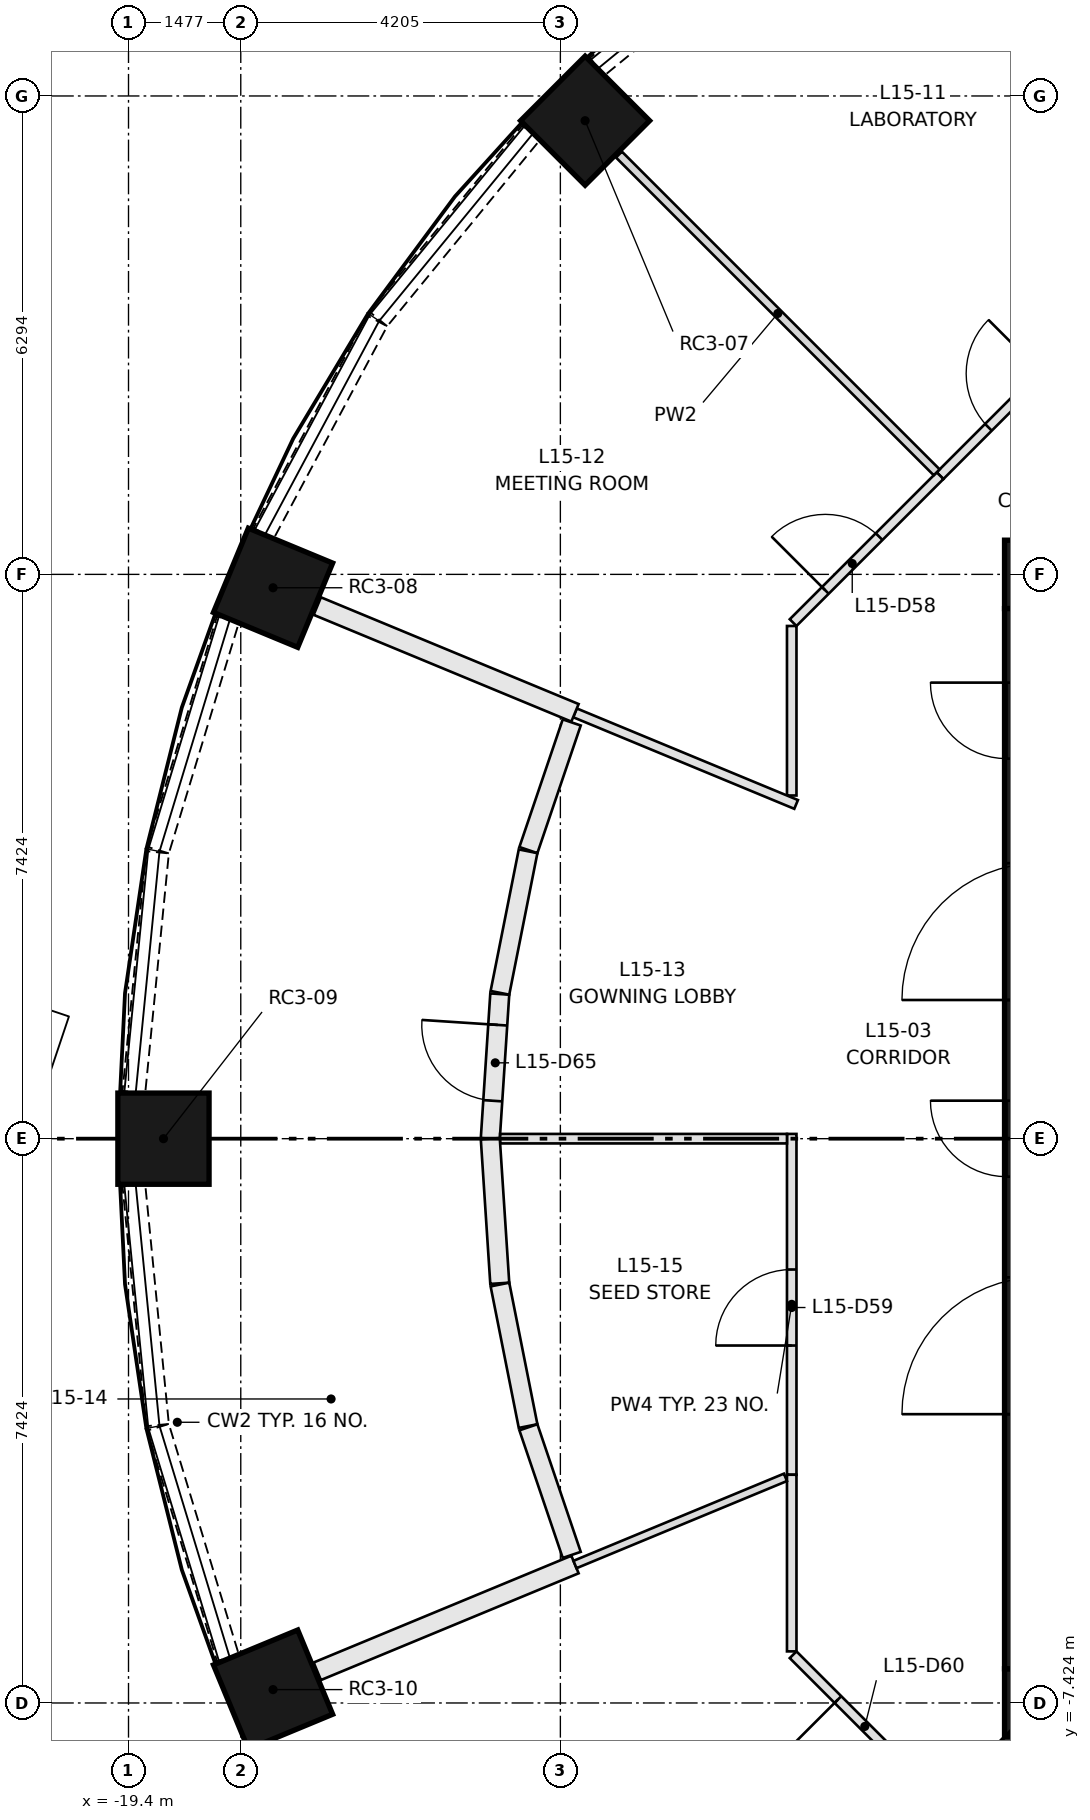
"""IFC4 building model, lengths in metres.
Left out: names, types, materials, properties, quantities, classifications, styles, units other than length and angle.
Written with IfcOpenShell. Run it as: python <this file> out.ifc"""

import sys

from ifc_helpers import new_model, si_unit, direction, frame, frame_2d, origin, origin_2d, place, context, subcontext, project, spatial, rectangle, extrude, element, fill, save


model = new_model("IFC4")
c1 = context("Model", 3, precision=1e-05, world=origin(), true_north=direction((0.0, 1.0)))
c2 = subcontext(c1, "Body", "Model", "MODEL_VIEW")
j1 = project(units=[si_unit("LENGTHUNIT", "METRE"), si_unit("PLANEANGLEUNIT", "RADIAN")], contexts=[c1])
p1 = place(None, origin())
s1 = spatial("IfcSite", under=j1, at=p1, CompositionType="ELEMENT")
p2 = place(p1, origin())
s2 = spatial("IfcBuilding", under=s1, at=p2, CompositionType="ELEMENT")
p3 = place(p2, frame((0.0, 0.0, 59.05)))
s3 = spatial("IfcBuildingStorey", under=s2, at=p3, CompositionType="ELEMENT", Elevation=59.05)
for number, where, z_axis, x_axis in (
    (1, (-13.393, 13.393, 0.0), (0.0, 0.0, 1.0), (-0.707, 0.707, 0.0)),
    (2, (-17.498, 7.248, 0.0), (0.0, 0.0, 1.0), (-0.924, 0.383, 0.0)),
    (3, (-18.94, 0.0, 0.0), (0.0, 0.0, 1.0), (-1.0, 0.0, 0.0)),
    (4, (-17.498, -7.248, 0.0), (0.0, 0.0, 1.0), (-0.924, -0.383, 0.0)),
):
    element("IfcColumn", number, at=place(p3, frame(where, z_axis=z_axis, x_axis=x_axis)), inside=s3, PredefinedType="COLUMN", context=c2, shape_type="SweptSolid", body=[
        extrude(rectangle(XDim=1.2, YDim=1.2, at=origin_2d()), origin(), (0.0, 0.0, 1.0), 3.65),
    ])
for number, where, z_axis, x_axis in (
    (5, (-7.874, -7.424, 0.0), (0.0, 0.0, 1.0), (1.0, 0.0, 0.0)),
    (6, (-7.874, 7.424, 0.0), (0.0, 0.0, 1.0), (1.0, 0.0, 0.0)),
):
    element("IfcWall", number, at=place(p3, frame(where, z_axis=z_axis, x_axis=x_axis)), inside=s3, PredefinedType="SHEAR", context=c2, shape_type="SweptSolid", body=[
        extrude(rectangle(XDim=15.748, YDim=0.9, at=frame_2d((7.874, 0.0))), origin(), (0.0, 0.0, 1.0), 3.65),
    ])
p4 = place(p3, frame((-7.424, -6.974, 0.0), z_axis=(0.0, 0.0, 1.0), x_axis=(0.0, 1.0, 0.0)))
e7 = element("IfcWall", 7, at=p4, inside=s3, PredefinedType="SHEAR", context=c2, shape_type="SweptSolid", body=[
    extrude(rectangle(XDim=13.948, YDim=0.9, at=frame_2d((6.974, 0.0))), origin(), (0.0, 0.0, 1.0), 3.65),
])
p5 = place(p4, frame((6.474, 0.0, 0.0)))
e8 = element("IfcOpeningElement", 8, at=p5, cuts=e7, PredefinedType="OPENING", context=c2, shape_type="SweptSolid", body=[
    extrude(rectangle(XDim=1.0, YDim=2.1, at=frame_2d((0.5, 1.05))), frame((0.0, 0.46, 0.0), z_axis=(0.0, -1.0, 0.0), x_axis=(1.0, 0.0, 0.0)), (0.0, 0.0, 1.0), 0.92),
])
p6 = place(p4, frame((3.35, 0.0, 0.0)))
e9 = element("IfcOpeningElement", 9, at=p6, cuts=e7, PredefinedType="OPENING", context=c2, shape_type="SweptSolid", body=[
    extrude(rectangle(XDim=1.8, YDim=2.1, at=frame_2d((0.9, 1.05))), frame((0.0, 0.46, 0.0), z_axis=(0.0, -1.0, 0.0), x_axis=(1.0, 0.0, 0.0)), (0.0, 0.0, 1.0), 0.92),
])
p7 = place(p4, frame((8.799, 0.0, 0.0)))
e10 = element("IfcOpeningElement", 10, at=p7, cuts=e7, PredefinedType="OPENING", context=c2, shape_type="SweptSolid", body=[
    extrude(rectangle(XDim=1.8, YDim=2.1, at=frame_2d((0.9, 1.05))), frame((0.0, 0.46, 0.0), z_axis=(0.0, -1.0, 0.0), x_axis=(1.0, 0.0, 0.0)), (0.0, 0.0, 1.0), 0.92),
])
p8 = place(p4, frame((11.974, 0.0, 0.0)))
e11 = element("IfcOpeningElement", 11, at=p8, cuts=e7, PredefinedType="OPENING", context=c2, shape_type="SweptSolid", body=[
    extrude(rectangle(XDim=1.0, YDim=2.1, at=frame_2d((0.5, 1.05))), frame((0.0, 0.46, 0.0), z_axis=(0.0, -1.0, 0.0), x_axis=(1.0, 0.0, 0.0)), (0.0, 0.0, 1.0), 0.92),
])
for number, where, z_axis, x_axis in (
    (12, (-10.784, 16.113, 0.0), (0.0, 0.0, 1.0), (-0.773, -0.634, 0.0)),
    (13, (-14.103, 13.234, 0.0), (0.0, 0.0, 1.0), (-0.634, -0.773, 0.0)),
):
    element("IfcWall", number, at=place(p3, frame(where, z_axis=z_axis, x_axis=x_axis)), inside=s3, PredefinedType="SOLIDWALL", context=c2, shape_type="SweptSolid", body=[
        extrude(rectangle(XDim=3.169, YDim=0.3, at=frame_2d((1.585, 0.0))), origin(), (0.0, 0.0, 1.0), 0.9),
    ])
p9 = place(p3, frame((-16.129, 10.759, 0.0), z_axis=(0.0, 0.0, 1.0), x_axis=(-0.47123575379, -0.882007292685, 0.0)))
e14 = element("IfcWall", 14, at=p9, inside=s3, PredefinedType="SOLIDWALL", context=c2, shape_type="SweptSolid", body=[
    extrude(rectangle(XDim=3.17, YDim=0.3, at=frame_2d((1.585, 0.0))), origin(), (0.0, 0.0, 1.0), 0.9),
])
p10 = place(p3, frame((-18.092, 6.83, 0.0), z_axis=(0.0, 0.0, 1.0), x_axis=(-0.290456409527, -0.956888224489, 0.0)))
e15 = element("IfcWall", 15, at=p10, inside=s3, PredefinedType="SOLIDWALL", context=c2, shape_type="SweptSolid", body=[
    extrude(rectangle(XDim=3.169, YDim=0.3, at=frame_2d((1.584, 0.0))), origin(), (0.0, 0.0, 1.0), 0.9),
])
for number, where, z_axis, x_axis in (
    (16, (-19.019, 3.768, 0.0), (0.0, 0.0, 1.0), (-0.098, -0.995, 0.0)),
    (17, (-19.33, -0.613, 0.0), (0.0, 0.0, 1.0), (0.098, -0.995, 0.0)),
):
    element("IfcWall", number, at=place(p3, frame(where, z_axis=z_axis, x_axis=x_axis)), inside=s3, PredefinedType="SOLIDWALL", context=c2, shape_type="SweptSolid", body=[
        extrude(rectangle(XDim=3.171, YDim=0.3, at=frame_2d((1.585, 0.0))), origin(), (0.0, 0.0, 1.0), 0.9),
    ])
p11 = place(p3, frame((-19.013, -3.797, 0.0), z_axis=(0.0, 0.0, 1.0), x_axis=(0.290456409527, -0.956888224489, 0.0)))
e18 = element("IfcWall", 18, at=p11, inside=s3, PredefinedType="SOLIDWALL", context=c2, shape_type="SweptSolid", body=[
    extrude(rectangle(XDim=3.169, YDim=0.3, at=frame_2d((1.584, 0.0))), origin(), (0.0, 0.0, 1.0), 0.9),
])
p12 = place(p3, frame((-17.623, -7.963, 0.0), z_axis=(0.0, 0.0, 1.0), x_axis=(0.47123575379, -0.882007292685, 0.0)))
e19 = element("IfcWall", 19, at=p12, inside=s3, PredefinedType="SOLIDWALL", context=c2, shape_type="SweptSolid", body=[
    extrude(rectangle(XDim=3.17, YDim=0.3, at=frame_2d((1.585, 0.0))), origin(), (0.0, 0.0, 1.0), 0.9),
])
p13 = place(p3, frame((-8.722, 8.722, 0.0), z_axis=(0.0, 0.0, 1.0), x_axis=(0.707062130741, 0.707151428813, 0.0)))
e20 = element("IfcWall", 20, at=p13, inside=s3, PredefinedType="PARTITIONING", context=c2, shape_type="SweptSolid", body=[
    extrude(rectangle(XDim=2.734, YDim=0.125, at=frame_2d((1.367, 0.0))), origin(), (0.0, 0.0, 1.0), 3.3),
])
p14 = place(p13, frame((0.9, 0.0, 0.0)))
e21 = element("IfcOpeningElement", 21, at=p14, cuts=e20, PredefinedType="OPENING", context=c2, shape_type="SweptSolid", body=[
    extrude(rectangle(XDim=1.0, YDim=2.1, at=frame_2d((0.5, 1.05))), frame((0.0, 0.073, 0.0), z_axis=(0.0, -1.0, 0.0), x_axis=(1.0, 0.0, 0.0)), (0.0, 0.0, 1.0), 0.145),
])
p15 = place(p3, frame((-10.674, 4.515, 0.0), z_axis=(0.0, 0.0, 1.0), x_axis=(0.0, 1.0, 0.0)))
e22 = element("IfcWall", 22, at=p15, inside=s3, PredefinedType="PARTITIONING", context=c2, shape_type="SweptSolid", body=[
    extrude(rectangle(XDim=2.23, YDim=0.125, at=frame_2d((1.115, 0.0))), origin(), (0.0, 0.0, 1.0), 3.3),
])
p16 = place(p3, frame((-10.656, 6.789, 0.0), z_axis=(0.0, 0.0, 1.0), x_axis=(0.707151428813, 0.707062130741, 0.0)))
e23 = element("IfcWall", 23, at=p16, inside=s3, PredefinedType="PARTITIONING", context=c2, shape_type="SweptSolid", body=[
    extrude(rectangle(XDim=2.734, YDim=0.125, at=frame_2d((1.367, 0.0))), origin(), (0.0, 0.0, 1.0), 3.3),
])
p17 = place(p16, frame((0.6, 0.0, 0.0)))
e24 = element("IfcOpeningElement", 24, at=p17, cuts=e23, PredefinedType="OPENING", context=c2, shape_type="SweptSolid", body=[
    extrude(rectangle(XDim=1.0, YDim=2.1, at=frame_2d((0.5, 1.05))), frame((0.0, 0.073, 0.0), z_axis=(0.0, -1.0, 0.0), x_axis=(1.0, 0.0, 0.0)), (0.0, 0.0, 1.0), 0.145),
])
p18 = place(p3, frame((-10.674, -4.421, 0.0), z_axis=(0.0, 0.0, 1.0), x_axis=(0.0, 1.0, 0.0)))
e25 = element("IfcWall", 25, at=p18, inside=s3, PredefinedType="PARTITIONING", context=c2, shape_type="SweptSolid", body=[
    extrude(rectangle(XDim=4.484, YDim=0.125, at=frame_2d((2.242, 0.0))), origin(), (0.0, 0.0, 1.0), 3.3),
])
p19 = place(p18, frame((1.7, 0.0, 0.0)))
e26 = element("IfcOpeningElement", 26, at=p19, cuts=e25, PredefinedType="OPENING", context=c2, shape_type="SweptSolid", body=[
    extrude(rectangle(XDim=1.0, YDim=2.1, at=frame_2d((0.5, 1.05))), frame((0.0, 0.073, 0.0), z_axis=(0.0, -1.0, 0.0), x_axis=(1.0, 0.0, 0.0)), (0.0, 0.0, 1.0), 0.145),
])
p20 = place(p3, frame((-10.674, -6.745, 0.0), z_axis=(0.0, 0.0, 1.0), x_axis=(0.0, 1.0, 0.0)))
e27 = element("IfcWall", 27, at=p20, inside=s3, PredefinedType="PARTITIONING", context=c2, shape_type="SweptSolid", body=[
    extrude(rectangle(XDim=2.324, YDim=0.125, at=frame_2d((1.162, 0.0))), origin(), (0.0, 0.0, 1.0), 3.3),
])
p21 = place(p3, frame((-8.722, -8.722, 0.0), z_axis=(0.0, 0.0, 1.0), x_axis=(-0.707151428813, 0.707062130741, 0.0)))
e28 = element("IfcWall", 28, at=p21, inside=s3, PredefinedType="PARTITIONING", context=c2, shape_type="SweptSolid", body=[
    extrude(rectangle(XDim=2.734, YDim=0.125, at=frame_2d((1.367, 0.0))), origin(), (0.0, 0.0, 1.0), 3.3),
])
p22 = place(p21, frame((0.9, 0.0, 0.0)))
e29 = element("IfcOpeningElement", 29, at=p22, cuts=e28, PredefinedType="OPENING", context=c2, shape_type="SweptSolid", body=[
    extrude(rectangle(XDim=1.0, YDim=2.1, at=frame_2d((0.5, 1.05))), frame((0.0, 0.073, 0.0), z_axis=(0.0, -1.0, 0.0), x_axis=(1.0, 0.0, 0.0)), (0.0, 0.0, 1.0), 0.145),
])
p23 = place(p3, frame((-8.767, 8.767, 0.0), z_axis=(0.0, 0.0, 1.0), x_axis=(-0.707106781187, 0.707106781187, 0.0)))
e30 = element("IfcWall", 30, at=p23, inside=s3, PredefinedType="PARTITIONING", context=c2, shape_type="SweptSolid", body=[
    extrude(rectangle(XDim=5.912, YDim=0.11, at=frame_2d((2.956, 0.0))), origin(), (0.0, 0.0, 1.0), 3.3),
])
p24 = place(p3, frame((-10.616, 4.397, 0.0), z_axis=(0.0, 0.0, 1.0), x_axis=(-0.923884549049, 0.382671321147, 0.0)))
e31 = element("IfcWall", 31, at=p24, inside=s3, PredefinedType="PARTITIONING", context=c2, shape_type="SweptSolid", body=[
    extrude(rectangle(XDim=3.149, YDim=0.125, at=frame_2d((1.575, 0.0))), origin(), (0.0, 0.0, 1.0), 3.3),
])
p25 = place(p3, frame((-13.526, 5.603, 0.0), z_axis=(0.0, 0.0, 1.0), x_axis=(-0.923870076355, 0.382706260748, 0.0)))
e32 = element("IfcWall", 32, at=p25, inside=s3, PredefinedType="PARTITIONING", context=c2, shape_type="SweptSolid", body=[
    extrude(rectangle(XDim=3.67, YDim=0.25, at=frame_2d((1.835, 0.0))), origin(), (0.0, 0.0, 1.0), 3.3),
])
p26 = place(p3, frame((-14.64, 0.0, 0.0), z_axis=(0.0, 0.0, 1.0), x_axis=(0.065303653727, 0.997865438228, 0.0)))
e33 = element("IfcWall", 33, at=p26, inside=s3, PredefinedType="PARTITIONING", context=c2, shape_type="SweptSolid", body=[
    extrude(rectangle(XDim=1.907, YDim=0.25, at=frame_2d((0.953, 0.0))), origin(), (0.0, 0.0, 1.0), 3.3),
])
p27 = place(p26, frame((0.5, 0.0, 0.0)))
e34 = element("IfcOpeningElement", 34, at=p27, cuts=e33, PredefinedType="OPENING", context=c2, shape_type="SweptSolid", body=[
    extrude(rectangle(XDim=1.0, YDim=2.1, at=frame_2d((0.5, 1.05))), frame((0.0, 0.135, 0.0), z_axis=(0.0, -1.0, 0.0), x_axis=(1.0, 0.0, 0.0)), (0.0, 0.0, 1.0), 0.27),
])
p28 = place(p3, frame((-14.513, 1.919, 0.0), z_axis=(0.0, 0.0, 1.0), x_axis=(0.195077379777, 0.980787854686, 0.0)))
e35 = element("IfcWall", 35, at=p28, inside=s3, PredefinedType="PARTITIONING", context=c2, shape_type="SweptSolid", body=[
    extrude(rectangle(XDim=1.898, YDim=0.25, at=frame_2d((0.949, 0.0))), origin(), (0.0, 0.0, 1.0), 3.3),
])
p29 = place(p3, frame((-14.139, 3.797, 0.0), z_axis=(0.0, 0.0, 1.0), x_axis=(0.321468303742, 0.946920339674, 0.0)))
e36 = element("IfcWall", 36, at=p29, inside=s3, PredefinedType="PARTITIONING", context=c2, shape_type="SweptSolid", body=[
    extrude(rectangle(XDim=1.773, YDim=0.25, at=frame_2d((0.887, 0.0))), origin(), (0.0, 0.0, 1.0), 3.3),
])
p30 = place(p3, frame((-10.737, 0.0, 0.0), z_axis=(0.0, 0.0, 1.0), x_axis=(-1.0, 0.0, 0.0)))
e37 = element("IfcWall", 37, at=p30, inside=s3, PredefinedType="PARTITIONING", context=c2, shape_type="SweptSolid", body=[
    extrude(rectangle(XDim=3.774, YDim=0.125, at=frame_2d((1.887, 0.0))), origin(), (0.0, 0.0, 1.0), 3.3),
])
p31 = place(p3, frame((-14.64, 0.0, 0.0), z_axis=(0.0, 0.0, 1.0), x_axis=(0.065303653727, -0.997865438228, 0.0)))
e38 = element("IfcWall", 38, at=p31, inside=s3, PredefinedType="PARTITIONING", context=c2, shape_type="SweptSolid", body=[
    extrude(rectangle(XDim=1.907, YDim=0.25, at=frame_2d((0.953, 0.0))), origin(), (0.0, 0.0, 1.0), 3.3),
])
p32 = place(p3, frame((-14.513, -1.919, 0.0), z_axis=(0.0, 0.0, 1.0), x_axis=(0.195077379777, -0.980787854686, 0.0)))
e39 = element("IfcWall", 39, at=p32, inside=s3, PredefinedType="PARTITIONING", context=c2, shape_type="SweptSolid", body=[
    extrude(rectangle(XDim=1.898, YDim=0.25, at=frame_2d((0.949, 0.0))), origin(), (0.0, 0.0, 1.0), 3.3),
])
p33 = place(p3, frame((-14.139, -3.797, 0.0), z_axis=(0.0, 0.0, 1.0), x_axis=(0.321468303742, -0.946920339674, 0.0)))
e40 = element("IfcWall", 40, at=p33, inside=s3, PredefinedType="PARTITIONING", context=c2, shape_type="SweptSolid", body=[
    extrude(rectangle(XDim=1.773, YDim=0.25, at=frame_2d((0.887, 0.0))), origin(), (0.0, 0.0, 1.0), 3.3),
])
p34 = place(p3, frame((-13.526, -5.603, 0.0), z_axis=(0.0, 0.0, 1.0), x_axis=(-0.923870076355, -0.382706260748, 0.0)))
e41 = element("IfcWall", 41, at=p34, inside=s3, PredefinedType="PARTITIONING", context=c2, shape_type="SweptSolid", body=[
    extrude(rectangle(XDim=3.67, YDim=0.25, at=frame_2d((1.835, 0.0))), origin(), (0.0, 0.0, 1.0), 3.3),
])
p35 = place(p3, frame((-10.757, -4.456, 0.0), z_axis=(0.0, 0.0, 1.0), x_axis=(-0.923879826967, -0.382682721486, 0.0)))
e42 = element("IfcWall", 42, at=p35, inside=s3, PredefinedType="PARTITIONING", context=c2, shape_type="SweptSolid", body=[
    extrude(rectangle(XDim=2.997, YDim=0.105, at=frame_2d((1.499, 0.0))), origin(), (0.0, 0.0, 1.0), 3.3),
])
p36 = place(p5, origin())
e43 = element("IfcDoor", 43, at=p36, inside=s3, OperationType="SINGLE_SWING_RIGHT", PredefinedType="DOOR", context=c2, shape_type="SweptSolid", body=[
    extrude(rectangle(XDim=1.0, YDim=2.1, at=frame_2d((0.5, 1.05))), frame((0.0, 0.45, 0.0), z_axis=(0.0, -1.0, 0.0), x_axis=(1.0, 0.0, 0.0)), (0.0, 0.0, 1.0), 0.05),
])
fill(e8, e43)
p37 = place(p8, origin())
e44 = element("IfcDoor", 44, at=p37, inside=s3, OperationType="SINGLE_SWING_RIGHT", PredefinedType="DOOR", context=c2, shape_type="SweptSolid", body=[
    extrude(rectangle(XDim=1.0, YDim=2.1, at=frame_2d((0.5, 1.05))), frame((0.0, 0.45, 0.0), z_axis=(0.0, -1.0, 0.0), x_axis=(1.0, 0.0, 0.0)), (0.0, 0.0, 1.0), 0.05),
])
fill(e11, e44)
p38 = place(p14, origin())
e45 = element("IfcDoor", 45, at=p38, inside=s3, OperationType="SINGLE_SWING_RIGHT", PredefinedType="DOOR", context=c2, shape_type="SweptSolid", body=[
    extrude(rectangle(XDim=1.0, YDim=2.1, at=frame_2d((0.5, 1.05))), frame((0.0, 0.025, 0.0), z_axis=(0.0, -1.0, 0.0), x_axis=(1.0, 0.0, 0.0)), (0.0, 0.0, 1.0), 0.05),
])
fill(e21, e45)
p39 = place(p17, origin())
e46 = element("IfcDoor", 46, at=p39, inside=s3, OperationType="SINGLE_SWING_LEFT", PredefinedType="DOOR", context=c2, shape_type="SweptSolid", body=[
    extrude(rectangle(XDim=1.0, YDim=2.1, at=frame_2d((0.5, 1.05))), frame((0.0, 0.025, 0.0), z_axis=(0.0, -1.0, 0.0), x_axis=(1.0, 0.0, 0.0)), (0.0, 0.0, 1.0), 0.05),
])
fill(e24, e46)
p40 = place(p19, origin())
e47 = element("IfcDoor", 47, at=p40, inside=s3, OperationType="SINGLE_SWING_LEFT", PredefinedType="DOOR", context=c2, shape_type="SweptSolid", body=[
    extrude(rectangle(XDim=1.0, YDim=2.1, at=frame_2d((0.5, 1.05))), frame((0.0, 0.025, 0.0), z_axis=(0.0, -1.0, 0.0), x_axis=(1.0, 0.0, 0.0)), (0.0, 0.0, 1.0), 0.05),
])
fill(e26, e47)
p41 = place(p22, origin())
e48 = element("IfcDoor", 48, at=p41, inside=s3, OperationType="SINGLE_SWING_RIGHT", PredefinedType="DOOR", context=c2, shape_type="SweptSolid", body=[
    extrude(rectangle(XDim=1.0, YDim=2.1, at=frame_2d((0.5, 1.05))), frame((0.0, 0.025, 0.0), z_axis=(0.0, -1.0, 0.0), x_axis=(1.0, 0.0, 0.0)), (0.0, 0.0, 1.0), 0.05),
])
fill(e29, e48)
p42 = place(p27, origin())
e49 = element("IfcDoor", 49, at=p42, inside=s3, OperationType="SINGLE_SWING_RIGHT", PredefinedType="DOOR", context=c2, shape_type="SweptSolid", body=[
    extrude(rectangle(XDim=1.0, YDim=2.1, at=frame_2d((0.5, 1.05))), frame((0.0, 0.025, 0.0), z_axis=(0.0, -1.0, 0.0), x_axis=(1.0, 0.0, 0.0)), (0.0, 0.0, 1.0), 0.05),
])
fill(e34, e49)
save(model, sys.argv[1])
